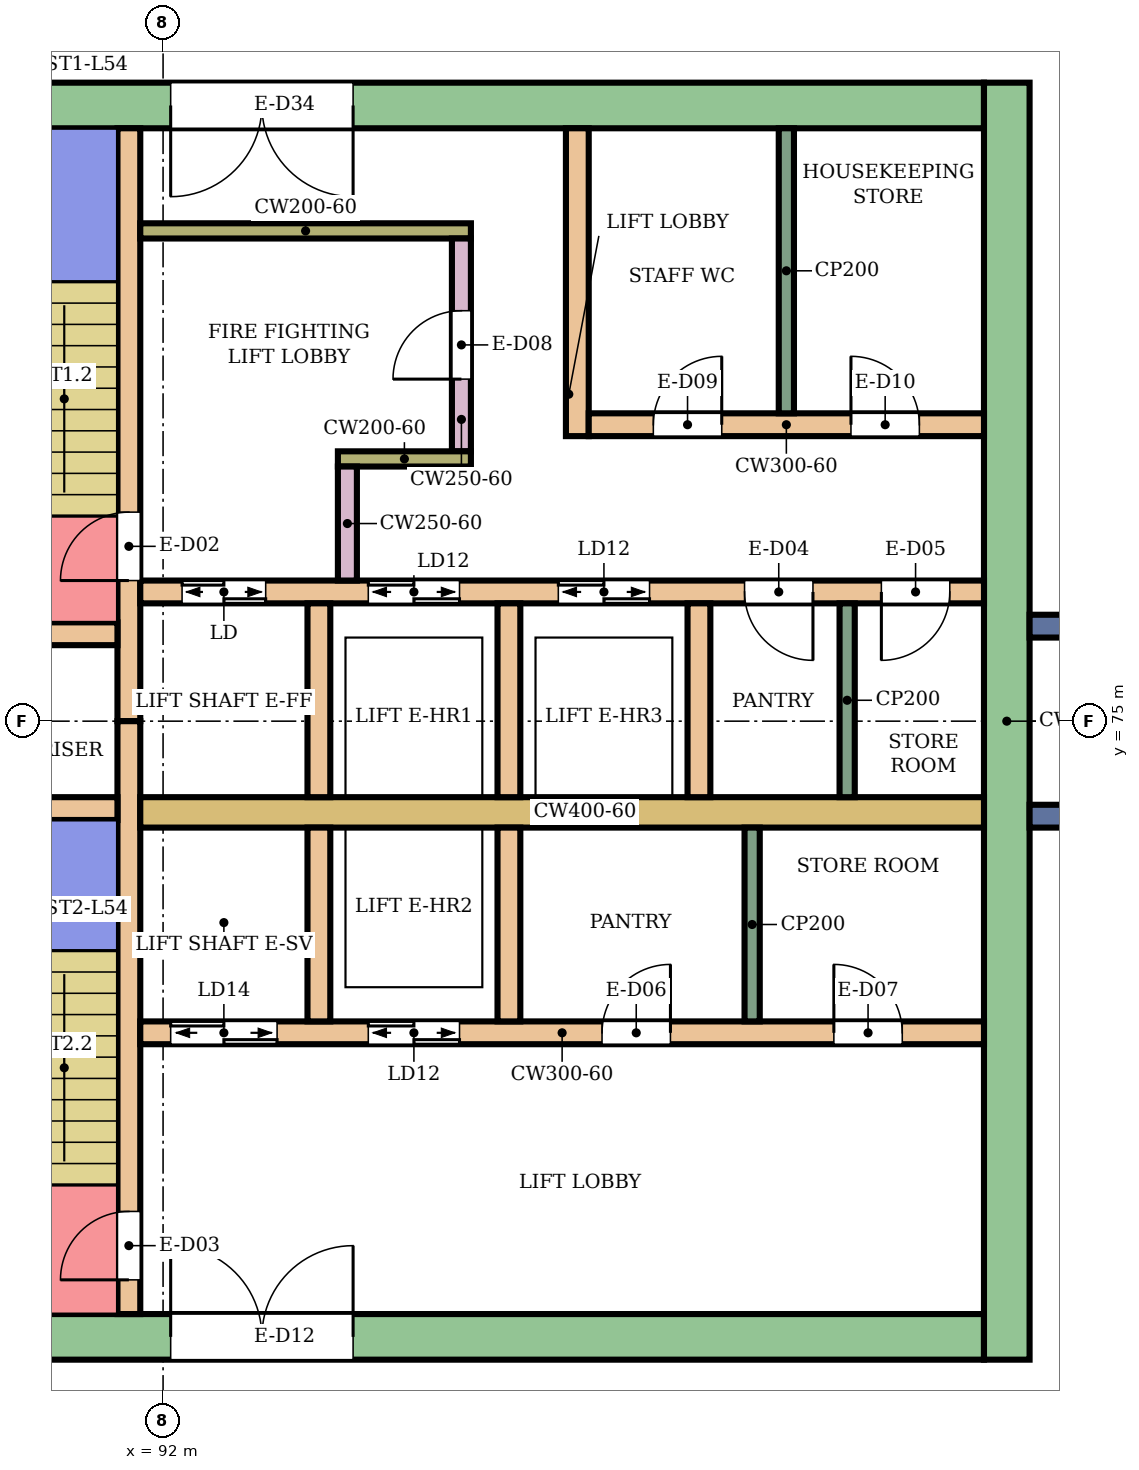
"""IFC4 building model, lengths in metres.
Left out: names, types, materials, properties, quantities, classifications, styles, units other than length and angle.
Written with IfcOpenShell. Run it as: python <this file> out.ifc"""

import sys

from ifc_helpers import new_model, si_unit, direction, frame, frame_2d, origin, place, context, subcontext, project, spatial, rectangle, extrude, element, fill, save


model = new_model("IFC4")
c1 = context("Model", 3, precision=1e-05, world=origin(), true_north=direction((0.0, 1.0)))
c2 = subcontext(c1, "Body", "Model", "MODEL_VIEW")
j1 = project(units=[si_unit("LENGTHUNIT", "METRE"), si_unit("PLANEANGLEUNIT", "RADIAN")], contexts=[c1])
p1 = place(None, origin())
s1 = spatial("IfcSite", under=j1, at=p1, CompositionType="ELEMENT")
p2 = place(p1, origin())
s2 = spatial("IfcBuilding", under=s1, at=p2, CompositionType="ELEMENT")
p3 = place(p2, frame((0.0, 0.0, 237.3)))
s3 = spatial("IfcBuildingStorey", under=s2, at=p3, CompositionType="ELEMENT", Elevation=237.3)
p4 = place(p3, frame((87.9, 83.1, 0.0), z_axis=(0.0, 0.0, 1.0), x_axis=(1.0, 0.0, 0.0)))
e1 = element("IfcWall", 1, at=p4, inside=s3, PredefinedType="SHEAR", context=c2, shape_type="SweptSolid", body=[
    extrude(rectangle(XDim=14.9, YDim=0.6, at=frame_2d((7.45, 0.0))), origin(), (0.0, 0.0, 1.0), 3.88),
])
p5 = place(p4, frame((4.2, 0.0, 0.0)))
e2 = element("IfcOpeningElement", 2, at=p5, cuts=e1, PredefinedType="OPENING", context=c2, shape_type="SweptSolid", body=[
    extrude(rectangle(XDim=2.4, YDim=2.4, at=frame_2d((1.2, 1.2))), frame((0.0, 0.31, 0.0), z_axis=(0.0, -1.0, 0.0), x_axis=(1.0, 0.0, 0.0)), (0.0, 0.0, 1.0), 0.62),
])
p6 = place(p3, frame((87.9, 66.9, 0.0), z_axis=(0.0, 0.0, 1.0), x_axis=(1.0, 0.0, 0.0)))
e3 = element("IfcWall", 3, at=p6, inside=s3, PredefinedType="SHEAR", context=c2, shape_type="SweptSolid", body=[
    extrude(rectangle(XDim=14.9, YDim=0.6, at=frame_2d((7.45, 0.0))), origin(), (0.0, 0.0, 1.0), 3.88),
])
p7 = place(p6, frame((4.2, 0.0, 0.0)))
e4 = element("IfcOpeningElement", 4, at=p7, cuts=e3, PredefinedType="OPENING", context=c2, shape_type="SweptSolid", body=[
    extrude(rectangle(XDim=2.4, YDim=2.4, at=frame_2d((1.2, 1.2))), frame((0.0, 0.31, 0.0), z_axis=(0.0, -1.0, 0.0), x_axis=(1.0, 0.0, 0.0)), (0.0, 0.0, 1.0), 0.62),
])
p8 = place(p3, frame((103.1, 66.6, 0.0), z_axis=(0.0, 0.0, 1.0), x_axis=(0.0, 1.0, 0.0)))
e5 = element("IfcWall", 5, at=p8, inside=s3, PredefinedType="SHEAR", context=c2, shape_type="SweptSolid", body=[
    extrude(rectangle(XDim=16.8, YDim=0.6, at=frame_2d((8.4, 0.0))), origin(), (0.0, 0.0, 1.0), 3.88),
])
p9 = place(p3, frame((91.55, 75.0, 0.0), z_axis=(0.0, 0.0, 1.0), x_axis=(0.0, 1.0, 0.0)))
e6 = element("IfcWall", 6, at=p9, inside=s3, PredefinedType="SHEAR", context=c2, shape_type="SweptSolid", body=[
    extrude(rectangle(XDim=7.8, YDim=0.3, at=frame_2d((3.9, 0.0))), origin(), (0.0, 0.0, 1.0), 3.88),
])
p10 = place(p9, frame((1.85, 0.0, 0.0)))
e7 = element("IfcOpeningElement", 7, at=p10, cuts=e6, PredefinedType="OPENING", context=c2, shape_type="SweptSolid", body=[
    extrude(rectangle(XDim=0.9, YDim=2.1, at=frame_2d((0.45, 1.05))), frame((0.0, 0.16, 0.0), z_axis=(0.0, -1.0, 0.0), x_axis=(1.0, 0.0, 0.0)), (0.0, 0.0, 1.0), 0.32),
])
p11 = place(p3, frame((91.55, 67.2, 0.0), z_axis=(0.0, 0.0, 1.0), x_axis=(0.0, 1.0, 0.0)))
e8 = element("IfcWall", 8, at=p11, inside=s3, PredefinedType="SHEAR", context=c2, shape_type="SweptSolid", body=[
    extrude(rectangle(XDim=7.8, YDim=0.3, at=frame_2d((3.9, 0.0))), origin(), (0.0, 0.0, 1.0), 3.88),
])
p12 = place(p11, frame((0.45, 0.0, 0.0)))
e9 = element("IfcOpeningElement", 9, at=p12, cuts=e8, PredefinedType="OPENING", context=c2, shape_type="SweptSolid", body=[
    extrude(rectangle(XDim=0.9, YDim=2.1, at=frame_2d((0.45, 1.05))), frame((0.0, 0.16, 0.0), z_axis=(0.0, -1.0, 0.0), x_axis=(1.0, 0.0, 0.0)), (0.0, 0.0, 1.0), 0.32),
])
p13 = place(p3, frame((88.35, 76.15, 0.0), z_axis=(0.0, 0.0, 1.0), x_axis=(1.0, 0.0, 0.0)))
e10 = element("IfcWall", 10, at=p13, inside=s3, PredefinedType="SHEAR", context=c2, shape_type="SweptSolid", body=[
    extrude(rectangle(XDim=3.05, YDim=0.3, at=frame_2d((1.525, 0.0))), origin(), (0.0, 0.0, 1.0), 3.88),
])
p14 = place(p13, frame((1.1, 0.0, 0.0)))
e11 = element("IfcOpeningElement", 11, at=p14, cuts=e10, PredefinedType="OPENING", context=c2, shape_type="SweptSolid", body=[
    extrude(rectangle(XDim=0.7, YDim=2.0, at=frame_2d((0.35, 1.0))), frame((0.0, 0.16, 0.0), z_axis=(0.0, -1.0, 0.0), x_axis=(1.0, 0.0, 0.0)), (0.0, 0.0, 1.0), 0.32),
])
p15 = place(p3, frame((88.35, 73.85, 0.0), z_axis=(0.0, 0.0, 1.0), x_axis=(1.0, 0.0, 0.0)))
e12 = element("IfcWall", 12, at=p15, inside=s3, PredefinedType="SHEAR", context=c2, shape_type="SweptSolid", body=[
    extrude(rectangle(XDim=3.05, YDim=0.3, at=frame_2d((1.525, 0.0))), origin(), (0.0, 0.0, 1.0), 3.88),
])
p16 = place(p3, frame((91.7, 76.7, 0.0), z_axis=(0.0, 0.0, 1.0), x_axis=(1.0, 0.0, 0.0)))
e13 = element("IfcWall", 13, at=p16, inside=s3, PredefinedType="SHEAR", context=c2, shape_type="SweptSolid", body=[
    extrude(rectangle(XDim=11.1, YDim=0.3, at=frame_2d((5.55, 0.0))), origin(), (0.0, 0.0, 1.0), 3.88),
])
p17 = place(p16, frame((0.55, 0.0, 0.0)))
e14 = element("IfcOpeningElement", 14, at=p17, cuts=e13, PredefinedType="OPENING", context=c2, shape_type="SweptSolid", body=[
    extrude(rectangle(XDim=1.1, YDim=2.1, at=frame_2d((0.55, 1.05))), frame((0.0, 0.16, 0.0), z_axis=(0.0, -1.0, 0.0), x_axis=(1.0, 0.0, 0.0)), (0.0, 0.0, 1.0), 0.32),
])
p18 = place(p16, frame((3.0, 0.0, 0.0)))
e15 = element("IfcOpeningElement", 15, at=p18, cuts=e13, PredefinedType="OPENING", context=c2, shape_type="SweptSolid", body=[
    extrude(rectangle(XDim=1.2, YDim=2.1, at=frame_2d((0.6, 1.05))), frame((0.0, 0.16, 0.0), z_axis=(0.0, -1.0, 0.0), x_axis=(1.0, 0.0, 0.0)), (0.0, 0.0, 1.0), 0.32),
])
p19 = place(p16, frame((5.5, 0.0, 0.0)))
e16 = element("IfcOpeningElement", 16, at=p19, cuts=e13, PredefinedType="OPENING", context=c2, shape_type="SweptSolid", body=[
    extrude(rectangle(XDim=1.2, YDim=2.1, at=frame_2d((0.6, 1.05))), frame((0.0, 0.16, 0.0), z_axis=(0.0, -1.0, 0.0), x_axis=(1.0, 0.0, 0.0)), (0.0, 0.0, 1.0), 0.32),
])
p20 = place(p16, frame((7.95, 0.0, 0.0)))
e17 = element("IfcOpeningElement", 17, at=p20, cuts=e13, PredefinedType="OPENING", context=c2, shape_type="SweptSolid", body=[
    extrude(rectangle(XDim=0.9, YDim=2.1, at=frame_2d((0.45, 1.05))), frame((0.0, 0.16, 0.0), z_axis=(0.0, -1.0, 0.0), x_axis=(1.0, 0.0, 0.0)), (0.0, 0.0, 1.0), 0.32),
])
p21 = place(p16, frame((9.75, 0.0, 0.0)))
e18 = element("IfcOpeningElement", 18, at=p21, cuts=e13, PredefinedType="OPENING", context=c2, shape_type="SweptSolid", body=[
    extrude(rectangle(XDim=0.9, YDim=2.1, at=frame_2d((0.45, 1.05))), frame((0.0, 0.16, 0.0), z_axis=(0.0, -1.0, 0.0), x_axis=(1.0, 0.0, 0.0)), (0.0, 0.0, 1.0), 0.32),
])
p22 = place(p3, frame((91.7, 73.8, 0.0), z_axis=(0.0, 0.0, 1.0), x_axis=(1.0, 0.0, 0.0)))
e19 = element("IfcWall", 19, at=p22, inside=s3, PredefinedType="SHEAR", context=c2, shape_type="SweptSolid", body=[
    extrude(rectangle(XDim=11.1, YDim=0.4, at=frame_2d((5.55, 0.0))), origin(), (0.0, 0.0, 1.0), 3.88),
])
p23 = place(p3, frame((91.7, 70.9, 0.0), z_axis=(0.0, 0.0, 1.0), x_axis=(1.0, 0.0, 0.0)))
e20 = element("IfcWall", 20, at=p23, inside=s3, PredefinedType="SHEAR", context=c2, shape_type="SweptSolid", body=[
    extrude(rectangle(XDim=11.1, YDim=0.3, at=frame_2d((5.55, 0.0))), origin(), (0.0, 0.0, 1.0), 3.88),
])
p24 = place(p23, frame((0.4, 0.0, 0.0)))
e21 = element("IfcOpeningElement", 21, at=p24, cuts=e20, PredefinedType="OPENING", context=c2, shape_type="SweptSolid", body=[
    extrude(rectangle(XDim=1.4, YDim=2.1, at=frame_2d((0.7, 1.05))), frame((0.0, 0.16, 0.0), z_axis=(0.0, -1.0, 0.0), x_axis=(1.0, 0.0, 0.0)), (0.0, 0.0, 1.0), 0.32),
])
p25 = place(p23, frame((3.0, 0.0, 0.0)))
e22 = element("IfcOpeningElement", 22, at=p25, cuts=e20, PredefinedType="OPENING", context=c2, shape_type="SweptSolid", body=[
    extrude(rectangle(XDim=1.2, YDim=2.1, at=frame_2d((0.6, 1.05))), frame((0.0, 0.16, 0.0), z_axis=(0.0, -1.0, 0.0), x_axis=(1.0, 0.0, 0.0)), (0.0, 0.0, 1.0), 0.32),
])
p26 = place(p23, frame((6.075, 0.0, 0.0)))
e23 = element("IfcOpeningElement", 23, at=p26, cuts=e20, PredefinedType="OPENING", context=c2, shape_type="SweptSolid", body=[
    extrude(rectangle(XDim=0.9, YDim=2.1, at=frame_2d((0.45, 1.05))), frame((0.0, 0.16, 0.0), z_axis=(0.0, -1.0, 0.0), x_axis=(1.0, 0.0, 0.0)), (0.0, 0.0, 1.0), 0.32),
])
p27 = place(p23, frame((9.125, 0.0, 0.0)))
e24 = element("IfcOpeningElement", 24, at=p27, cuts=e20, PredefinedType="OPENING", context=c2, shape_type="SweptSolid", body=[
    extrude(rectangle(XDim=0.9, YDim=2.1, at=frame_2d((0.45, 1.05))), frame((0.0, 0.16, 0.0), z_axis=(0.0, -1.0, 0.0), x_axis=(1.0, 0.0, 0.0)), (0.0, 0.0, 1.0), 0.32),
])
for number, where, z_axis, x_axis in (
    (25, (94.05, 74.0, 0.0), (0.0, 0.0, 1.0), (0.0, 1.0, 0.0)),
    (26, (96.55, 74.0, 0.0), (0.0, 0.0, 1.0), (0.0, 1.0, 0.0)),
    (27, (99.05, 74.0, 0.0), (0.0, 0.0, 1.0), (0.0, 1.0, 0.0)),
    (28, (94.05, 71.05, 0.0), (0.0, 0.0, 1.0), (0.0, 1.0, 0.0)),
    (29, (96.55, 71.05, 0.0), (0.0, 0.0, 1.0), (0.0, 1.0, 0.0)),
):
    element("IfcWall", number, at=place(p3, frame(where, z_axis=z_axis, x_axis=x_axis)), inside=s3, PredefinedType="SHEAR", context=c2, shape_type="SweptSolid", body=[
        extrude(rectangle(XDim=2.55, YDim=0.3, at=frame_2d((1.275, 0.0))), origin(), (0.0, 0.0, 1.0), 3.88),
    ])
p28 = place(p3, frame((91.7, 81.45, 0.0), z_axis=(0.0, 0.0, 1.0), x_axis=(1.0, 0.0, 0.0)))
e30 = element("IfcWall", 30, at=p28, inside=s3, PredefinedType="SHEAR", context=c2, shape_type="SweptSolid", body=[
    extrude(rectangle(XDim=4.35, YDim=0.2, at=frame_2d((2.175, 0.0))), origin(), (0.0, 0.0, 1.0), 3.88),
])
p29 = place(p3, frame((95.925, 78.55, 0.0), z_axis=(0.0, 0.0, 1.0), x_axis=(0.0, 1.0, 0.0)))
e31 = element("IfcWall", 31, at=p29, inside=s3, PredefinedType="SHEAR", context=c2, shape_type="SweptSolid", body=[
    extrude(rectangle(XDim=2.8, YDim=0.25, at=frame_2d((1.4, 0.0))), origin(), (0.0, 0.0, 1.0), 3.88),
])
p30 = place(p29, frame((0.95, 0.0, 0.0)))
e32 = element("IfcOpeningElement", 32, at=p30, cuts=e31, PredefinedType="OPENING", context=c2, shape_type="SweptSolid", body=[
    extrude(rectangle(XDim=0.9, YDim=2.1, at=frame_2d((0.45, 1.05))), frame((0.0, 0.135, 0.0), z_axis=(0.0, -1.0, 0.0), x_axis=(1.0, 0.0, 0.0)), (0.0, 0.0, 1.0), 0.27),
])
p31 = place(p3, frame((94.3, 78.45, 0.0), z_axis=(0.0, 0.0, 1.0), x_axis=(1.0, 0.0, 0.0)))
e33 = element("IfcWall", 33, at=p31, inside=s3, PredefinedType="SHEAR", context=c2, shape_type="SweptSolid", body=[
    extrude(rectangle(XDim=1.75, YDim=0.2, at=frame_2d((0.875, 0.0))), origin(), (0.0, 0.0, 1.0), 3.88),
])
p32 = place(p3, frame((94.425, 76.85, 0.0), z_axis=(0.0, 0.0, 1.0), x_axis=(0.0, 1.0, 0.0)))
e34 = element("IfcWall", 34, at=p32, inside=s3, PredefinedType="SHEAR", context=c2, shape_type="SweptSolid", body=[
    extrude(rectangle(XDim=1.5, YDim=0.25, at=frame_2d((0.75, 0.0))), origin(), (0.0, 0.0, 1.0), 3.88),
])
p33 = place(p3, frame((97.45, 78.75, 0.0), z_axis=(0.0, 0.0, 1.0), x_axis=(0.0, 1.0, 0.0)))
e35 = element("IfcWall", 35, at=p33, inside=s3, PredefinedType="SHEAR", context=c2, shape_type="SweptSolid", body=[
    extrude(rectangle(XDim=4.05, YDim=0.3, at=frame_2d((2.025, 0.0))), origin(), (0.0, 0.0, 1.0), 3.88),
])
p34 = place(p3, frame((97.6, 78.9, 0.0), z_axis=(0.0, 0.0, 1.0), x_axis=(1.0, 0.0, 0.0)))
e36 = element("IfcWall", 36, at=p34, inside=s3, PredefinedType="SHEAR", context=c2, shape_type="SweptSolid", body=[
    extrude(rectangle(XDim=5.2, YDim=0.3, at=frame_2d((2.6, 0.0))), origin(), (0.0, 0.0, 1.0), 3.88),
])
p35 = place(p34, frame((0.85, 0.0, 0.0)))
e37 = element("IfcOpeningElement", 37, at=p35, cuts=e36, PredefinedType="OPENING", context=c2, shape_type="SweptSolid", body=[
    extrude(rectangle(XDim=0.9, YDim=2.1, at=frame_2d((0.45, 1.05))), frame((0.0, 0.16, 0.0), z_axis=(0.0, -1.0, 0.0), x_axis=(1.0, 0.0, 0.0)), (0.0, 0.0, 1.0), 0.32),
])
p36 = place(p34, frame((3.45, 0.0, 0.0)))
e38 = element("IfcOpeningElement", 38, at=p36, cuts=e36, PredefinedType="OPENING", context=c2, shape_type="SweptSolid", body=[
    extrude(rectangle(XDim=0.9, YDim=2.1, at=frame_2d((0.45, 1.05))), frame((0.0, 0.16, 0.0), z_axis=(0.0, -1.0, 0.0), x_axis=(1.0, 0.0, 0.0)), (0.0, 0.0, 1.0), 0.32),
])
for number, where, z_axis, x_axis in (
    (39, (103.4, 73.75, 0.0), (0.0, 0.0, 1.0), (1.0, 0.0, 0.0)),
    (40, (103.4, 76.25, 0.0), (0.0, 0.0, 1.0), (1.0, 0.0, 0.0)),
):
    element("IfcWall", number, at=place(p3, frame(where, z_axis=z_axis, x_axis=x_axis)), inside=s3, PredefinedType="NOTDEFINED", context=c2, shape_type="SweptSolid", body=[
        extrude(rectangle(XDim=2.416, YDim=0.3, at=frame_2d((1.208, 0.0))), origin(), (0.0, 0.0, 1.0), 4.2),
    ])
for number, where, z_axis, x_axis in (
    (41, (101.0, 74.0, 0.0), (0.0, 0.0, 1.0), (0.0, 1.0, 0.0)),
    (42, (99.75, 71.05, 0.0), (0.0, 0.0, 1.0), (0.0, 1.0, 0.0)),
):
    element("IfcWall", number, at=place(p3, frame(where, z_axis=z_axis, x_axis=x_axis)), inside=s3, PredefinedType="PARTITIONING", context=c2, shape_type="SweptSolid", body=[
        extrude(rectangle(XDim=2.55, YDim=0.2, at=frame_2d((1.275, 0.0))), origin(), (0.0, 0.0, 1.0), 3.88),
    ])
p37 = place(p3, frame((100.2, 79.05, 0.0), z_axis=(0.0, 0.0, 1.0), x_axis=(0.0, 1.0, 0.0)))
e43 = element("IfcWall", 43, at=p37, inside=s3, PredefinedType="PARTITIONING", context=c2, shape_type="SweptSolid", body=[
    extrude(rectangle(XDim=3.75, YDim=0.2, at=frame_2d((1.875, 0.0))), origin(), (0.0, 0.0, 1.0), 3.88),
])
p38 = place(p10, origin())
e44 = element("IfcDoor", 44, at=p38, inside=s3, OperationType="SINGLE_SWING_LEFT", PredefinedType="DOOR", context=c2, shape_type="SweptSolid", body=[
    extrude(rectangle(XDim=0.9, YDim=2.1, at=frame_2d((0.45, 1.05))), frame((0.0, 0.025, 0.0), z_axis=(0.0, -1.0, 0.0), x_axis=(1.0, 0.0, 0.0)), (0.0, 0.0, 1.0), 0.05),
])
fill(e7, e44)
p39 = place(p12, origin())
e45 = element("IfcDoor", 45, at=p39, inside=s3, OperationType="SINGLE_SWING_LEFT", PredefinedType="DOOR", context=c2, shape_type="SweptSolid", body=[
    extrude(rectangle(XDim=0.9, YDim=2.1, at=frame_2d((0.45, 1.05))), frame((0.0, 0.025, 0.0), z_axis=(0.0, -1.0, 0.0), x_axis=(1.0, 0.0, 0.0)), (0.0, 0.0, 1.0), 0.05),
])
fill(e9, e45)
p40 = place(p17, origin())
e46 = element("IfcDoor", 46, at=p40, inside=s3, OperationType="DOUBLE_DOOR_SLIDING", PredefinedType="DOOR", context=c2, shape_type="SweptSolid", body=[
    extrude(rectangle(XDim=1.1, YDim=2.1, at=frame_2d((0.55, 1.05))), frame((0.0, 0.025, 0.0), z_axis=(0.0, -1.0, 0.0), x_axis=(1.0, 0.0, 0.0)), (0.0, 0.0, 1.0), 0.05),
])
fill(e14, e46)
p41 = place(p18, origin())
e47 = element("IfcDoor", 47, at=p41, inside=s3, OperationType="DOUBLE_DOOR_SLIDING", PredefinedType="DOOR", context=c2, shape_type="SweptSolid", body=[
    extrude(rectangle(XDim=1.2, YDim=2.1, at=frame_2d((0.6, 1.05))), frame((0.0, 0.025, 0.0), z_axis=(0.0, -1.0, 0.0), x_axis=(1.0, 0.0, 0.0)), (0.0, 0.0, 1.0), 0.05),
])
fill(e15, e47)
p42 = place(p19, origin())
e48 = element("IfcDoor", 48, at=p42, inside=s3, OperationType="DOUBLE_DOOR_SLIDING", PredefinedType="DOOR", context=c2, shape_type="SweptSolid", body=[
    extrude(rectangle(XDim=1.2, YDim=2.1, at=frame_2d((0.6, 1.05))), frame((0.0, 0.025, 0.0), z_axis=(0.0, -1.0, 0.0), x_axis=(1.0, 0.0, 0.0)), (0.0, 0.0, 1.0), 0.05),
])
fill(e16, e48)
p43 = place(p20, frame((0.9, 0.0, 0.0), z_axis=(0.0, 0.0, 1.0), x_axis=(-1.0, 0.0, 0.0)))
e49 = element("IfcDoor", 49, at=p43, inside=s3, OperationType="SINGLE_SWING_LEFT", PredefinedType="DOOR", context=c2, shape_type="SweptSolid", body=[
    extrude(rectangle(XDim=0.9, YDim=2.1, at=frame_2d((0.45, 1.05))), frame((0.0, 0.025, 0.0), z_axis=(0.0, -1.0, 0.0), x_axis=(1.0, 0.0, 0.0)), (0.0, 0.0, 1.0), 0.05),
])
fill(e17, e49)
p44 = place(p21, frame((0.9, 0.0, 0.0), z_axis=(0.0, 0.0, 1.0), x_axis=(-1.0, 0.0, 0.0)))
e50 = element("IfcDoor", 50, at=p44, inside=s3, OperationType="SINGLE_SWING_RIGHT", PredefinedType="DOOR", context=c2, shape_type="SweptSolid", body=[
    extrude(rectangle(XDim=0.9, YDim=2.1, at=frame_2d((0.45, 1.05))), frame((0.0, 0.025, 0.0), z_axis=(0.0, -1.0, 0.0), x_axis=(1.0, 0.0, 0.0)), (0.0, 0.0, 1.0), 0.05),
])
fill(e18, e50)
p45 = place(p24, origin())
e51 = element("IfcDoor", 51, at=p45, inside=s3, OperationType="DOUBLE_DOOR_SLIDING", PredefinedType="DOOR", context=c2, shape_type="SweptSolid", body=[
    extrude(rectangle(XDim=1.4, YDim=2.1, at=frame_2d((0.7, 1.05))), frame((0.0, 0.025, 0.0), z_axis=(0.0, -1.0, 0.0), x_axis=(1.0, 0.0, 0.0)), (0.0, 0.0, 1.0), 0.05),
])
fill(e21, e51)
p46 = place(p25, origin())
e52 = element("IfcDoor", 52, at=p46, inside=s3, OperationType="DOUBLE_DOOR_SLIDING", PredefinedType="DOOR", context=c2, shape_type="SweptSolid", body=[
    extrude(rectangle(XDim=1.2, YDim=2.1, at=frame_2d((0.6, 1.05))), frame((0.0, 0.025, 0.0), z_axis=(0.0, -1.0, 0.0), x_axis=(1.0, 0.0, 0.0)), (0.0, 0.0, 1.0), 0.05),
])
fill(e22, e52)
p47 = place(p26, origin())
e53 = element("IfcDoor", 53, at=p47, inside=s3, OperationType="SINGLE_SWING_RIGHT", PredefinedType="DOOR", context=c2, shape_type="SweptSolid", body=[
    extrude(rectangle(XDim=0.9, YDim=2.1, at=frame_2d((0.45, 1.05))), frame((0.0, 0.025, 0.0), z_axis=(0.0, -1.0, 0.0), x_axis=(1.0, 0.0, 0.0)), (0.0, 0.0, 1.0), 0.05),
])
fill(e23, e53)
p48 = place(p27, origin())
e54 = element("IfcDoor", 54, at=p48, inside=s3, OperationType="SINGLE_SWING_LEFT", PredefinedType="DOOR", context=c2, shape_type="SweptSolid", body=[
    extrude(rectangle(XDim=0.9, YDim=2.1, at=frame_2d((0.45, 1.05))), frame((0.0, 0.025, 0.0), z_axis=(0.0, -1.0, 0.0), x_axis=(1.0, 0.0, 0.0)), (0.0, 0.0, 1.0), 0.05),
])
fill(e24, e54)
p49 = place(p30, origin())
e55 = element("IfcDoor", 55, at=p49, inside=s3, OperationType="SINGLE_SWING_LEFT", PredefinedType="DOOR", context=c2, shape_type="SweptSolid", body=[
    extrude(rectangle(XDim=0.9, YDim=2.1, at=frame_2d((0.45, 1.05))), frame((0.0, 0.025, 0.0), z_axis=(0.0, -1.0, 0.0), x_axis=(1.0, 0.0, 0.0)), (0.0, 0.0, 1.0), 0.05),
])
fill(e32, e55)
p50 = place(p35, origin())
e56 = element("IfcDoor", 56, at=p50, inside=s3, OperationType="SINGLE_SWING_RIGHT", PredefinedType="DOOR", context=c2, shape_type="SweptSolid", body=[
    extrude(rectangle(XDim=0.9, YDim=2.1, at=frame_2d((0.45, 1.05))), frame((0.0, 0.025, 0.0), z_axis=(0.0, -1.0, 0.0), x_axis=(1.0, 0.0, 0.0)), (0.0, 0.0, 1.0), 0.05),
])
fill(e37, e56)
p51 = place(p36, origin())
e57 = element("IfcDoor", 57, at=p51, inside=s3, OperationType="SINGLE_SWING_LEFT", PredefinedType="DOOR", context=c2, shape_type="SweptSolid", body=[
    extrude(rectangle(XDim=0.9, YDim=2.1, at=frame_2d((0.45, 1.05))), frame((0.0, 0.025, 0.0), z_axis=(0.0, -1.0, 0.0), x_axis=(1.0, 0.0, 0.0)), (0.0, 0.0, 1.0), 0.05),
])
fill(e38, e57)
p52 = place(p5, frame((2.4, 0.0, 0.0), z_axis=(0.0, 0.0, 1.0), x_axis=(-1.0, 0.0, 0.0)))
e58 = element("IfcDoor", 58, at=p52, inside=s3, OperationType="DOUBLE_DOOR_SINGLE_SWING", PredefinedType="DOOR", context=c2, shape_type="SweptSolid", body=[
    extrude(rectangle(XDim=2.4, YDim=2.4, at=frame_2d((1.2, 1.2))), frame((0.0, 0.025, 0.0), z_axis=(0.0, -1.0, 0.0), x_axis=(1.0, 0.0, 0.0)), (0.0, 0.0, 1.0), 0.05),
])
fill(e2, e58)
p53 = place(p7, origin())
e59 = element("IfcDoor", 59, at=p53, inside=s3, OperationType="DOUBLE_DOOR_SINGLE_SWING", PredefinedType="DOOR", context=c2, shape_type="SweptSolid", body=[
    extrude(rectangle(XDim=2.4, YDim=2.4, at=frame_2d((1.2, 1.2))), frame((0.0, 0.025, 0.0), z_axis=(0.0, -1.0, 0.0), x_axis=(1.0, 0.0, 0.0)), (0.0, 0.0, 1.0), 0.05),
])
fill(e4, e59)
save(model, sys.argv[1])
